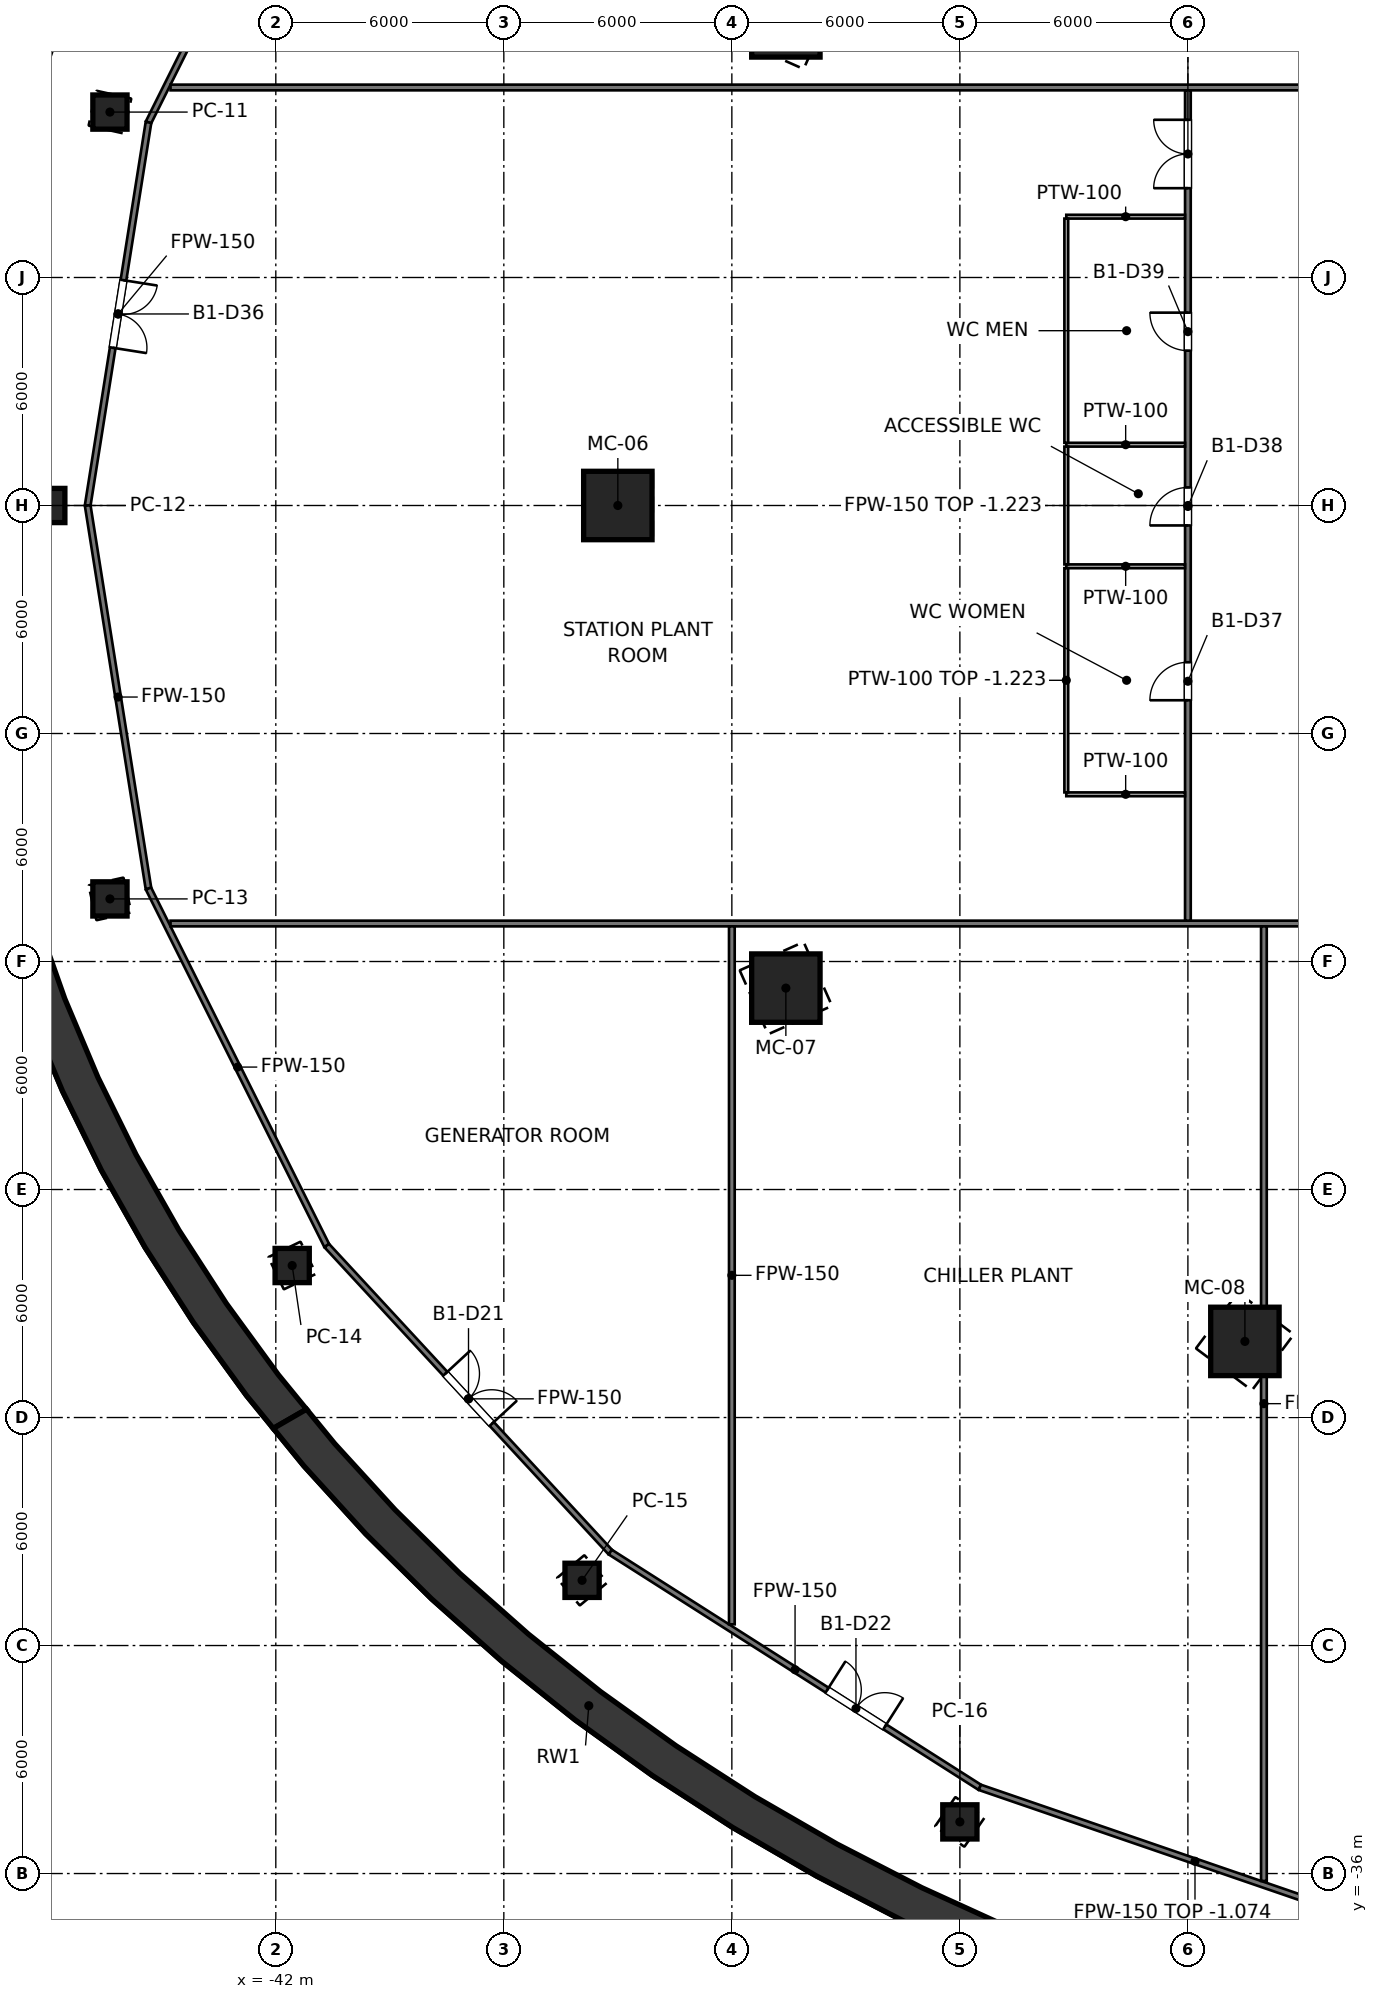
"""IFC4 building model, lengths in metres.
Left out: names, types, materials, properties, quantities, classifications, styles, units other than length and angle.
Written with IfcOpenShell. Run it as: python <this file> out.ifc"""

import sys

from ifc_helpers import new_model, si_unit, direction, frame, frame_2d, origin, origin_2d, place, context, subcontext, project, spatial, polyline, rectangle, hollow_rectangle, outline, extrude, element, fill, save


model = new_model("IFC4")
c1 = context("Model", 3, precision=1e-05, world=origin(), true_north=direction((0.0, 1.0)))
c2 = subcontext(c1, "Body", "Model", "MODEL_VIEW")
j1 = project(units=[si_unit("LENGTHUNIT", "METRE"), si_unit("PLANEANGLEUNIT", "RADIAN")], contexts=[c1])
p1 = place(None, origin())
s1 = spatial("IfcSite", under=j1, at=p1, CompositionType="ELEMENT")
p2 = place(p1, origin())
s2 = spatial("IfcBuilding", under=s1, at=p2, CompositionType="ELEMENT")
p3 = place(p2, frame((0.0, 0.0, -5.0)))
s3 = spatial("IfcBuildingStorey", under=s2, at=p3, CompositionType="ELEMENT", Elevation=-5.0)
p4 = place(p3, frame((0.0, 0.0, -0.3)))
e1 = element("IfcWall", 1, at=p4, inside=s3, PredefinedType="SOLIDWALL", context=c2, shape_type="SweptSolid", body=[
    extrude(outline(polyline([(-51.0, 0.0), (-50.0, 0.0), (-49.931, 2.198), (-49.726, 4.39), (-49.385, 6.57), (-48.907, 8.732), (-48.296, 10.87), (-47.553, 12.979), (-46.679, 15.052), (-45.677, 17.083), (-44.55, 19.068), (-43.301, 21.0), (-41.934, 22.875), (-41.191, 23.782), (-42.065, 24.287), (-42.772, 23.419), (-44.167, 21.5), (-45.441, 19.521), (-46.591, 17.49), (-47.613, 15.41), (-48.504, 13.288), (-49.262, 11.129), (-49.885, 8.94), (-50.372, 6.727), (-50.721, 4.495), (-50.93, 2.25), (-51.0, 0.0)])), origin(), (0.0, 0.0, 1.0), 5.1),
])
e2 = element("IfcWall", 2, at=p4, inside=s3, PredefinedType="SOLIDWALL", context=c2, shape_type="SweptSolid", body=[
    extrude(outline(polyline([(-42.065, -24.287), (-41.191, -23.782), (-41.934, -22.875), (-43.301, -21.0), (-44.55, -19.068), (-45.677, -17.083), (-46.679, -15.052), (-47.553, -12.979), (-48.296, -10.87), (-48.907, -8.732), (-49.385, -6.57), (-49.726, -4.39), (-49.931, -2.198), (-50.0, 0.0), (-50.0, 0.0), (-51.0, 0.0), (-51.0, 0.0), (-50.93, -2.25), (-50.721, -4.495), (-50.372, -6.727), (-49.885, -8.94), (-49.262, -11.129), (-48.504, -13.288), (-47.613, -15.41), (-46.591, -17.49), (-45.441, -19.521), (-44.167, -21.5), (-42.772, -23.419), (-42.065, -24.287)])), origin(), (0.0, 0.0, 1.0), 5.1),
])
e3 = element("IfcWall", 3, at=p4, inside=s3, PredefinedType="SOLIDWALL", context=c2, shape_type="SweptSolid", body=[
    extrude(outline(polyline([(-22.315, -38.651), (-21.811, -37.778), (-22.699, -37.422), (-25.0, -36.373), (-27.232, -35.224), (-29.389, -33.979), (-31.466, -32.64), (-33.457, -31.212), (-35.355, -29.698), (-37.157, -28.104), (-38.857, -26.431), (-40.451, -24.687), (-41.191, -23.782), (-42.065, -24.287), (-41.26, -25.275), (-39.635, -27.061), (-37.9, -28.773), (-36.062, -30.406), (-34.126, -31.955), (-32.095, -33.417), (-29.977, -34.788), (-27.777, -36.063), (-25.5, -37.239), (-23.154, -38.313), (-22.315, -38.651)])), origin(), (0.0, 0.0, 1.0), 5.1),
])
for number, where, z_axis, x_axis in (
    (4, (-28.579, 12.7, -0.3), (0.0, 0.0, 1.0), (-0.914, 0.406, 0.0)),
    (5, (-33.0, 0.0, -0.3), (0.0, 0.0, 1.0), (-1.0, 0.0, 0.0)),
    (6, (-28.579, -12.7, -0.3), (0.0, 0.0, 1.0), (-0.914, -0.406, 0.0)),
    (7, (-16.5, -21.997, -0.3), (0.0, 0.0, 1.0), (-0.6, -0.8, 0.0)),
):
    element("IfcColumn", number, at=place(p3, frame(where, z_axis=z_axis, x_axis=x_axis)), inside=s3, PredefinedType="COLUMN", context=c2, shape_type="SweptSolid", body=[
        extrude(hollow_rectangle(XDim=1.8, YDim=1.8, WallThickness=0.08, at=origin_2d()), origin(), (0.0, 0.0, 1.0), 5.3),
    ])
for number, where, z_axis, x_axis in (
    (8, (-46.365, 10.353, -0.3), (0.0, 0.0, 1.0), (-0.976, 0.218, 0.0)),
    (9, (-48.0, 0.0, -0.3), (0.0, 0.0, 1.0), (-1.0, 0.0, 0.0)),
    (10, (-46.365, -10.353, -0.3), (0.0, 0.0, 1.0), (-0.976, -0.218, 0.0)),
    (11, (-41.569, -20.0, -0.3), (0.0, 0.0, 1.0), (-0.901, -0.434, 0.0)),
    (12, (-33.941, -28.284, -0.3), (0.0, 0.0, 1.0), (-0.768, -0.64, 0.0)),
    (13, (-24.0, -34.641, -0.3), (0.0, 0.0, 1.0), (-0.569, -0.822, 0.0)),
):
    element("IfcColumn", number, at=place(p3, frame(where, z_axis=z_axis, x_axis=x_axis)), inside=s3, PredefinedType="COLUMN", context=c2, shape_type="SweptSolid", body=[
        extrude(hollow_rectangle(XDim=0.9, YDim=0.9, WallThickness=0.04, at=origin_2d()), origin(), (0.0, 0.0, 1.0), 5.3),
    ])
p5 = place(p3, frame((-40.66, 19.475, 0.0), z_axis=(0.0, 0.0, 1.0), x_axis=(-0.446692676619, -0.894687460879, 0.0)))
e14 = element("IfcWall", 14, at=p5, inside=s3, PredefinedType="PARTITIONING", context=c2, shape_type="SweptSolid", body=[
    extrude(rectangle(XDim=10.5, YDim=0.15, at=frame_2d((5.25, 0.0))), origin(), (0.0, 0.0, 1.0), 3.845),
])
p6 = place(p3, frame((-45.35, 10.081, 0.0), z_axis=(0.0, 0.0, 1.0), x_axis=(-0.156737547616, -0.98764028936, 0.0)))
e15 = element("IfcWall", 15, at=p6, inside=s3, PredefinedType="PARTITIONING", context=c2, shape_type="SweptSolid", body=[
    extrude(rectangle(XDim=10.207, YDim=0.15, at=frame_2d((5.104, 0.0))), origin(), (0.0, 0.0, 1.0), 3.845),
])
p7 = place(p6, frame((4.204, 0.0, 0.0)))
e16 = element("IfcOpeningElement", 16, at=p7, cuts=e15, PredefinedType="OPENING", context=c2, shape_type="SweptSolid", body=[
    extrude(rectangle(XDim=1.8, YDim=2.1, at=frame_2d((0.9, 1.05))), frame((0.0, 0.075, 0.0), z_axis=(0.0, -1.0, 0.0), x_axis=(1.0, 0.0, 0.0)), (0.0, 0.0, 1.0), 0.15),
])
p8 = place(p3, frame((-46.95, 0.0, 0.0), z_axis=(0.0, 0.0, 1.0), x_axis=(0.156737547616, -0.98764028936, 0.0)))
e17 = element("IfcWall", 17, at=p8, inside=s3, PredefinedType="PARTITIONING", context=c2, shape_type="SweptSolid", body=[
    extrude(rectangle(XDim=10.207, YDim=0.15, at=frame_2d((5.104, 0.0))), origin(), (0.0, 0.0, 1.0), 3.845),
])
p9 = place(p3, frame((-45.35, -10.081, 0.0), z_axis=(0.0, 0.0, 1.0), x_axis=(0.446692676619, -0.894687460879, 0.0)))
e18 = element("IfcWall", 18, at=p9, inside=s3, PredefinedType="PARTITIONING", context=c2, shape_type="SweptSolid", body=[
    extrude(rectangle(XDim=10.5, YDim=0.15, at=frame_2d((5.25, 0.0))), origin(), (0.0, 0.0, 1.0), 3.845),
])
p10 = place(p3, frame((-40.66, -19.475, 0.0), z_axis=(0.0, 0.0, 1.0), x_axis=(0.679018932137, -0.734120759685, 0.0)))
e19 = element("IfcWall", 19, at=p10, inside=s3, PredefinedType="PARTITIONING", context=c2, shape_type="SweptSolid", body=[
    extrude(rectangle(XDim=10.988, YDim=0.15, at=frame_2d((5.494, 0.0))), origin(), (0.0, 0.0, 1.0), 3.845),
])
p11 = place(p10, frame((4.594, 0.0, 0.0)))
e20 = element("IfcOpeningElement", 20, at=p11, cuts=e19, PredefinedType="OPENING", context=c2, shape_type="SweptSolid", body=[
    extrude(rectangle(XDim=1.8, YDim=2.1, at=frame_2d((0.9, 1.05))), frame((0.0, 0.075, 0.0), z_axis=(0.0, -1.0, 0.0), x_axis=(1.0, 0.0, 0.0)), (0.0, 0.0, 1.0), 0.15),
])
p12 = place(p3, frame((-33.199, -27.542, 0.0), z_axis=(0.0, 0.0, 1.0), x_axis=(0.84357600759, -0.537009794527, 0.0)))
e21 = element("IfcWall", 21, at=p12, inside=s3, PredefinedType="PARTITIONING", context=c2, shape_type="SweptSolid", body=[
    extrude(rectangle(XDim=11.527, YDim=0.15, at=frame_2d((5.763, 0.0))), origin(), (0.0, 0.0, 1.0), 3.845),
])
p13 = place(p12, frame((6.763, 0.0, 0.0)))
e22 = element("IfcOpeningElement", 22, at=p13, cuts=e21, PredefinedType="OPENING", context=c2, shape_type="SweptSolid", body=[
    extrude(rectangle(XDim=1.8, YDim=2.1, at=frame_2d((0.9, 1.05))), frame((0.0, 0.075, 0.0), z_axis=(0.0, -1.0, 0.0), x_axis=(1.0, 0.0, 0.0)), (0.0, 0.0, 1.0), 0.15),
])
p14 = place(p3, frame((-23.475, -33.732, 0.0), z_axis=(0.0, 0.0, 1.0), x_axis=(0.945720874623, -0.324980041391, 0.0)))
e23 = element("IfcWall", 23, at=p14, inside=s3, PredefinedType="PARTITIONING", context=c2, shape_type="SweptSolid", body=[
    extrude(rectangle(XDim=11.973, YDim=0.15, at=frame_2d((5.987, 0.0))), origin(), (0.0, 0.0, 1.0), 3.926),
])
p15 = place(p3, frame((-44.77, 11.0, 0.0), z_axis=(0.0, 0.0, 1.0), x_axis=(1.0, 0.0, 0.0)))
e24 = element("IfcWall", 24, at=p15, inside=s3, PredefinedType="PARTITIONING", context=c2, shape_type="SweptSolid", body=[
    extrude(rectangle(XDim=89.54, YDim=0.15, at=frame_2d((44.77, 0.0))), origin(), (0.0, 0.0, 1.0), 3.768),
])
p16 = place(p15, frame((43.85, 0.0, 0.0)))
e25 = element("IfcOpeningElement", 25, at=p16, cuts=e24, PredefinedType="OPENING", context=c2, shape_type="SweptSolid", body=[
    extrude(rectangle(XDim=1.8, YDim=2.1, at=frame_2d((0.9, 1.05))), frame((0.0, 0.075, 0.0), z_axis=(0.0, -1.0, 0.0), x_axis=(1.0, 0.0, 0.0)), (0.0, 0.0, 1.0), 0.15),
])
p17 = place(p3, frame((-44.77, -11.0, 0.0), z_axis=(0.0, 0.0, 1.0), x_axis=(1.0, 0.0, 0.0)))
e26 = element("IfcWall", 26, at=p17, inside=s3, PredefinedType="PARTITIONING", context=c2, shape_type="SweptSolid", body=[
    extrude(rectangle(XDim=89.54, YDim=0.15, at=frame_2d((44.77, 0.0))), origin(), (0.0, 0.0, 1.0), 3.768),
])
p18 = place(p17, frame((33.5, 0.0, 0.0)))
e27 = element("IfcOpeningElement", 27, at=p18, cuts=e26, PredefinedType="OPENING", context=c2, shape_type="SweptSolid", body=[
    extrude(rectangle(XDim=1.0, YDim=2.1, at=frame_2d((0.5, 1.05))), frame((0.0, 0.075, 0.0), z_axis=(0.0, -1.0, 0.0), x_axis=(1.0, 0.0, 0.0)), (0.0, 0.0, 1.0), 0.15),
])
p19 = place(p17, frame((44.25, 0.0, 0.0)))
e28 = element("IfcOpeningElement", 28, at=p19, cuts=e26, PredefinedType="OPENING", context=c2, shape_type="SweptSolid", body=[
    extrude(rectangle(XDim=1.0, YDim=2.1, at=frame_2d((0.5, 1.05))), frame((0.0, 0.075, 0.0), z_axis=(0.0, -1.0, 0.0), x_axis=(1.0, 0.0, 0.0)), (0.0, 0.0, 1.0), 0.15),
])
p20 = place(p17, frame((55.5, 0.0, 0.0)))
e29 = element("IfcOpeningElement", 29, at=p20, cuts=e26, PredefinedType="OPENING", context=c2, shape_type="SweptSolid", body=[
    extrude(rectangle(XDim=1.0, YDim=2.1, at=frame_2d((0.5, 1.05))), frame((0.0, 0.075, 0.0), z_axis=(0.0, -1.0, 0.0), x_axis=(1.0, 0.0, 0.0)), (0.0, 0.0, 1.0), 0.15),
])
p21 = place(p3, frame((-18.0, -10.925, 0.0), z_axis=(0.0, 0.0, 1.0), x_axis=(0.0, 1.0, 0.0)))
e30 = element("IfcWall", 30, at=p21, inside=s3, PredefinedType="PARTITIONING", context=c2, shape_type="SweptSolid", body=[
    extrude(rectangle(XDim=21.85, YDim=0.15, at=frame_2d((10.925, 0.0))), origin(), (0.0, 0.0, 1.0), 3.777),
])
p22 = place(p21, frame((19.275, 0.0, 0.0)))
e31 = element("IfcOpeningElement", 31, at=p22, cuts=e30, PredefinedType="OPENING", context=c2, shape_type="SweptSolid", body=[
    extrude(rectangle(XDim=1.8, YDim=2.1, at=frame_2d((0.9, 1.05))), frame((0.0, 0.075, 0.0), z_axis=(0.0, -1.0, 0.0), x_axis=(1.0, 0.0, 0.0)), (0.0, 0.0, 1.0), 0.15),
])
p23 = place(p21, frame((5.8, 0.0, 0.0)))
e32 = element("IfcOpeningElement", 32, at=p23, cuts=e30, PredefinedType="OPENING", context=c2, shape_type="SweptSolid", body=[
    extrude(rectangle(XDim=1.0, YDim=2.1, at=frame_2d((0.5, 1.05))), frame((0.0, 0.075, 0.0), z_axis=(0.0, -1.0, 0.0), x_axis=(1.0, 0.0, 0.0)), (0.0, 0.0, 1.0), 0.15),
])
p24 = place(p21, frame((10.4, 0.0, 0.0)))
e33 = element("IfcOpeningElement", 33, at=p24, cuts=e30, PredefinedType="OPENING", context=c2, shape_type="SweptSolid", body=[
    extrude(rectangle(XDim=1.0, YDim=2.1, at=frame_2d((0.5, 1.05))), frame((0.0, 0.075, 0.0), z_axis=(0.0, -1.0, 0.0), x_axis=(1.0, 0.0, 0.0)), (0.0, 0.0, 1.0), 0.15),
])
p25 = place(p21, frame((15.0, 0.0, 0.0)))
e34 = element("IfcOpeningElement", 34, at=p25, cuts=e30, PredefinedType="OPENING", context=c2, shape_type="SweptSolid", body=[
    extrude(rectangle(XDim=1.0, YDim=2.1, at=frame_2d((0.5, 1.05))), frame((0.0, 0.075, 0.0), z_axis=(0.0, -1.0, 0.0), x_axis=(1.0, 0.0, 0.0)), (0.0, 0.0, 1.0), 0.15),
])
p26 = place(p3, frame((-30.0, -11.075, 0.0), z_axis=(0.0, 0.0, 1.0), x_axis=(0.0, -1.0, 0.0)))
e35 = element("IfcWall", 35, at=p26, inside=s3, PredefinedType="PARTITIONING", context=c2, shape_type="SweptSolid", body=[
    extrude(rectangle(XDim=18.366, YDim=0.15, at=frame_2d((9.183, 0.0))), origin(), (0.0, 0.0, 1.0), 3.845),
])
p27 = place(p3, frame((-16.0, -11.075, 0.0), z_axis=(0.0, 0.0, 1.0), x_axis=(0.0, -1.0, 0.0)))
e36 = element("IfcWall", 36, at=p27, inside=s3, PredefinedType="PARTITIONING", context=c2, shape_type="SweptSolid", body=[
    extrude(rectangle(XDim=25.12, YDim=0.15, at=frame_2d((12.56, 0.0))), origin(), (0.0, 0.0, 1.0), 3.777),
])
for number, where, z_axis, x_axis in (
    (37, (-21.2, -7.6, 0.0), (0.0, 0.0, 1.0), (1.0, 0.0, 0.0)),
    (38, (-18.075, -1.6, 0.0), (0.0, 0.0, 1.0), (-1.0, 0.0, 0.0)),
):
    element("IfcWall", number, at=place(p3, frame(where, z_axis=z_axis, x_axis=x_axis)), inside=s3, PredefinedType="PARTITIONING", context=c2, shape_type="SweptSolid", body=[
        extrude(rectangle(XDim=3.125, YDim=0.1, at=frame_2d((1.562, 0.0))), origin(), (0.0, 0.0, 1.0), 4.7),
    ])
p28 = place(p3, frame((-21.2, -1.65, 0.0), z_axis=(0.0, 0.0, 1.0), x_axis=(0.0, -1.0, 0.0)))
e39 = element("IfcWall", 39, at=p28, inside=s3, PredefinedType="PARTITIONING", context=c2, shape_type="SweptSolid", body=[
    extrude(rectangle(XDim=5.9, YDim=0.1, at=frame_2d((2.95, 0.0))), origin(), (0.0, 0.0, 1.0), 3.777),
])
p29 = place(p3, frame((-18.075, 1.6, 0.0), z_axis=(0.0, 0.0, 1.0), x_axis=(-1.0, 0.0, 0.0)))
e40 = element("IfcWall", 40, at=p29, inside=s3, PredefinedType="PARTITIONING", context=c2, shape_type="SweptSolid", body=[
    extrude(rectangle(XDim=3.125, YDim=0.1, at=frame_2d((1.562, 0.0))), origin(), (0.0, 0.0, 1.0), 4.7),
])
p30 = place(p3, frame((-21.2, 1.55, 0.0), z_axis=(0.0, 0.0, 1.0), x_axis=(0.0, -1.0, 0.0)))
e41 = element("IfcWall", 41, at=p30, inside=s3, PredefinedType="PARTITIONING", context=c2, shape_type="SweptSolid", body=[
    extrude(rectangle(XDim=3.1, YDim=0.1, at=frame_2d((1.55, 0.0))), origin(), (0.0, 0.0, 1.0), 3.777),
])
p31 = place(p3, frame((-18.075, 7.6, 0.0), z_axis=(0.0, 0.0, 1.0), x_axis=(-1.0, 0.0, 0.0)))
e42 = element("IfcWall", 42, at=p31, inside=s3, PredefinedType="PARTITIONING", context=c2, shape_type="SweptSolid", body=[
    extrude(rectangle(XDim=3.125, YDim=0.1, at=frame_2d((1.562, 0.0))), origin(), (0.0, 0.0, 1.0), 4.7),
])
p32 = place(p3, frame((-21.2, 7.55, 0.0), z_axis=(0.0, 0.0, 1.0), x_axis=(0.0, -1.0, 0.0)))
e43 = element("IfcWall", 43, at=p32, inside=s3, PredefinedType="PARTITIONING", context=c2, shape_type="SweptSolid", body=[
    extrude(rectangle(XDim=5.9, YDim=0.1, at=frame_2d((2.95, 0.0))), origin(), (0.0, 0.0, 1.0), 3.777),
])
p33 = place(p11, origin())
e44 = element("IfcDoor", 44, at=p33, inside=s3, OperationType="DOUBLE_DOOR_SINGLE_SWING", PredefinedType="DOOR", context=c2, shape_type="SweptSolid", body=[
    extrude(rectangle(XDim=1.8, YDim=2.1, at=frame_2d((0.9, 1.05))), frame((0.0, 0.025, 0.0), z_axis=(0.0, -1.0, 0.0), x_axis=(1.0, 0.0, 0.0)), (0.0, 0.0, 1.0), 0.05),
])
fill(e20, e44)
p34 = place(p13, origin())
e45 = element("IfcDoor", 45, at=p34, inside=s3, OperationType="DOUBLE_DOOR_SINGLE_SWING", PredefinedType="DOOR", context=c2, shape_type="SweptSolid", body=[
    extrude(rectangle(XDim=1.8, YDim=2.1, at=frame_2d((0.9, 1.05))), frame((0.0, 0.025, 0.0), z_axis=(0.0, -1.0, 0.0), x_axis=(1.0, 0.0, 0.0)), (0.0, 0.0, 1.0), 0.05),
])
fill(e22, e45)
p35 = place(p22, origin())
e46 = element("IfcDoor", 46, at=p35, inside=s3, OperationType="DOUBLE_DOOR_SINGLE_SWING", PredefinedType="DOOR", context=c2, shape_type="SweptSolid", body=[
    extrude(rectangle(XDim=1.8, YDim=2.1, at=frame_2d((0.9, 1.05))), frame((0.0, 0.025, 0.0), z_axis=(0.0, -1.0, 0.0), x_axis=(1.0, 0.0, 0.0)), (0.0, 0.0, 1.0), 0.05),
])
fill(e31, e46)
p36 = place(p7, origin())
e47 = element("IfcDoor", 47, at=p36, inside=s3, OperationType="DOUBLE_DOOR_SINGLE_SWING", PredefinedType="DOOR", context=c2, shape_type="SweptSolid", body=[
    extrude(rectangle(XDim=1.8, YDim=2.1, at=frame_2d((0.9, 1.05))), frame((0.0, 0.025, 0.0), z_axis=(0.0, -1.0, 0.0), x_axis=(1.0, 0.0, 0.0)), (0.0, 0.0, 1.0), 0.05),
])
fill(e16, e47)
p37 = place(p23, origin())
e48 = element("IfcDoor", 48, at=p37, inside=s3, OperationType="SINGLE_SWING_LEFT", PredefinedType="DOOR", context=c2, shape_type="SweptSolid", body=[
    extrude(rectangle(XDim=1.0, YDim=2.1, at=frame_2d((0.5, 1.05))), frame((0.0, 0.025, 0.0), z_axis=(0.0, -1.0, 0.0), x_axis=(1.0, 0.0, 0.0)), (0.0, 0.0, 1.0), 0.05),
])
fill(e32, e48)
p38 = place(p24, origin())
e49 = element("IfcDoor", 49, at=p38, inside=s3, OperationType="SINGLE_SWING_LEFT", PredefinedType="DOOR", context=c2, shape_type="SweptSolid", body=[
    extrude(rectangle(XDim=1.0, YDim=2.1, at=frame_2d((0.5, 1.05))), frame((0.0, 0.025, 0.0), z_axis=(0.0, -1.0, 0.0), x_axis=(1.0, 0.0, 0.0)), (0.0, 0.0, 1.0), 0.05),
])
fill(e33, e49)
p39 = place(p25, origin())
e50 = element("IfcDoor", 50, at=p39, inside=s3, OperationType="SINGLE_SWING_RIGHT", PredefinedType="DOOR", context=c2, shape_type="SweptSolid", body=[
    extrude(rectangle(XDim=1.0, YDim=2.1, at=frame_2d((0.5, 1.05))), frame((0.0, 0.025, 0.0), z_axis=(0.0, -1.0, 0.0), x_axis=(1.0, 0.0, 0.0)), (0.0, 0.0, 1.0), 0.05),
])
fill(e34, e50)
save(model, sys.argv[1])
